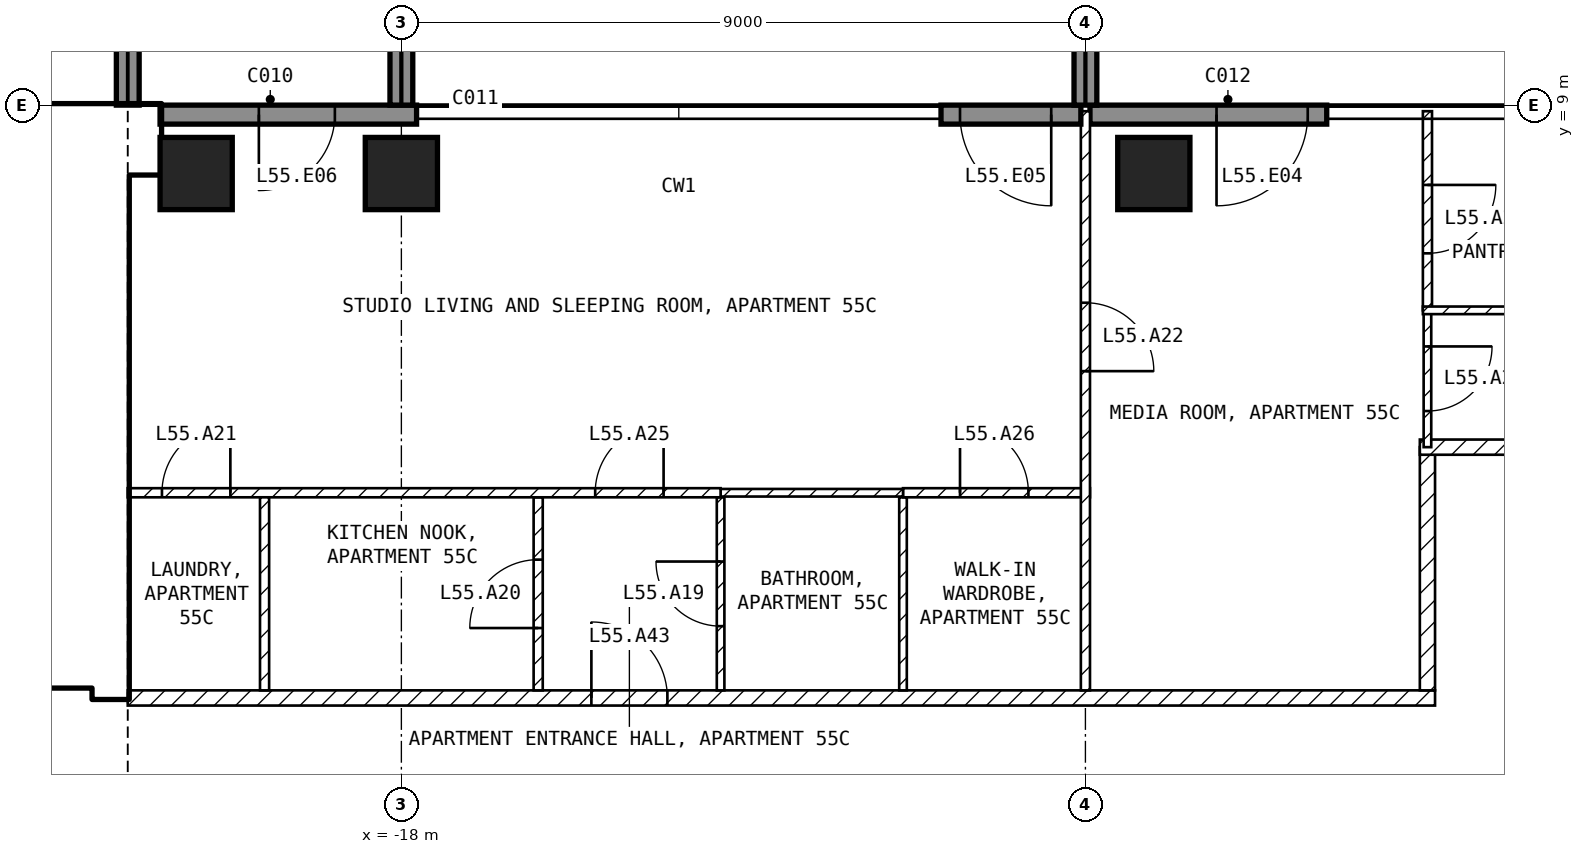
"""IFC4 building model, lengths in metres.
Left out: names, types, materials, properties, quantities, classifications, styles, units other than length and angle.
Written with IfcOpenShell. Run it as: python <this file> out.ifc"""

import sys

from ifc_helpers import new_model, si_unit, direction, frame, frame_2d, origin, origin_2d, place, context, subcontext, project, spatial, rectangle, extrude, element, fill, save


model = new_model("IFC4")
c1 = context("Model", 3, precision=1e-05, world=origin(), true_north=direction((0.0, 1.0)))
c2 = subcontext(c1, "Body", "Model", "MODEL_VIEW")
j1 = project(units=[si_unit("LENGTHUNIT", "METRE"), si_unit("PLANEANGLEUNIT", "RADIAN")], contexts=[c1])
p1 = place(None, origin())
s1 = spatial("IfcSite", under=j1, at=p1, CompositionType="ELEMENT")
p2 = place(p1, origin())
s2 = spatial("IfcBuilding", under=s1, at=p2, CompositionType="ELEMENT")
p3 = place(p2, frame((0.0, 0.0, 219.1)))
s3 = spatial("IfcBuildingStorey", under=s2, at=p3, CompositionType="ELEMENT", Elevation=219.1)
for number, where, z_axis, x_axis in (
    (1, (-20.7, 8.1, -0.25), (0.0, 0.0, 1.0), (1.0, 0.0, 0.0)),
    (2, (-18.0, 8.1, -0.25), (0.0, 0.0, 1.0), (1.0, 0.0, 0.0)),
    (3, (-8.1, 8.1, -0.25), (0.0, 0.0, 1.0), (1.0, 0.0, 0.0)),
):
    element("IfcColumn", number, at=place(p3, frame(where, z_axis=z_axis, x_axis=x_axis)), inside=s3, PredefinedType="COLUMN", context=c2, shape_type="SweptSolid", body=[
        extrude(rectangle(XDim=0.95, YDim=0.95, at=origin_2d()), origin(), (0.0, 0.0, 1.0), 3.45),
    ])
p4 = place(p3, frame((-5.825, 8.875, 0.0), z_axis=(0.0, 0.0, 1.0), x_axis=(-1.0, 0.0, 0.0)))
e4 = element("IfcWall", 4, at=p4, inside=s3, PredefinedType="SOLIDWALL", context=c2, shape_type="SweptSolid", body=[
    extrude(rectangle(XDim=3.115, YDim=0.25, at=frame_2d((1.558, 0.0))), origin(), (0.0, 0.0, 1.0), 3.2),
])
p5 = place(p4, frame((0.25, 0.0, 0.0)))
e5 = element("IfcOpeningElement", 5, at=p5, cuts=e4, PredefinedType="OPENING", context=c2, shape_type="SweptSolid", body=[
    extrude(rectangle(XDim=1.2, YDim=2.4, at=frame_2d((0.6, 1.2))), frame((0.0, 0.135, 0.0), z_axis=(0.0, -1.0, 0.0), x_axis=(1.0, 0.0, 0.0)), (0.0, 0.0, 1.0), 0.27),
])
p6 = place(p3, frame((-9.06, 8.875, 0.0), z_axis=(0.0, 0.0, 1.0), x_axis=(-1.0, 0.0, 0.0)))
e6 = element("IfcWall", 6, at=p6, inside=s3, PredefinedType="SOLIDWALL", context=c2, shape_type="SweptSolid", body=[
    extrude(rectangle(XDim=1.84, YDim=0.25, at=frame_2d((0.92, 0.0))), origin(), (0.0, 0.0, 1.0), 3.2),
])
p7 = place(p6, frame((0.39, 0.0, 0.0)))
e7 = element("IfcOpeningElement", 7, at=p7, cuts=e6, PredefinedType="OPENING", context=c2, shape_type="SweptSolid", body=[
    extrude(rectangle(XDim=1.2, YDim=2.4, at=frame_2d((0.6, 1.2))), frame((0.0, 0.135, 0.0), z_axis=(0.0, -1.0, 0.0), x_axis=(1.0, 0.0, 0.0)), (0.0, 0.0, 1.0), 0.27),
])
p8 = place(p3, frame((-17.8, 8.875, 0.0), z_axis=(0.0, 0.0, 1.0), x_axis=(-1.0, 0.0, 0.0)))
e8 = element("IfcWall", 8, at=p8, inside=s3, PredefinedType="SOLIDWALL", context=c2, shape_type="SweptSolid", body=[
    extrude(rectangle(XDim=3.375, YDim=0.25, at=frame_2d((1.688, 0.0))), origin(), (0.0, 0.0, 1.0), 3.2),
])
p9 = place(p8, frame((1.075, 0.0, 0.0)))
e9 = element("IfcOpeningElement", 9, at=p9, cuts=e8, PredefinedType="OPENING", context=c2, shape_type="SweptSolid", body=[
    extrude(rectangle(XDim=1.0, YDim=2.4, at=frame_2d((0.5, 1.2))), frame((0.0, 0.135, 0.0), z_axis=(0.0, -1.0, 0.0), x_axis=(1.0, 0.0, 0.0)), (0.0, 0.0, 1.0), 0.27),
])
for number, where, z_axis, x_axis in (
    (10, (-21.6, 9.0, 0.0), (0.0, 0.0, 1.0), (0.0, 1.0, 0.0)),
    (11, (-18.0, 9.0, 0.0), (0.0, 0.0, 1.0), (0.0, 1.0, 0.0)),
    (12, (-9.0, 9.0, 0.0), (0.0, 0.0, 1.0), (0.0, 1.0, 0.0)),
):
    element("IfcWall", number, at=place(p3, frame(where, z_axis=z_axis, x_axis=x_axis)), inside=s3, PredefinedType="SOLIDWALL", context=c2, shape_type="SweptSolid", body=[
        extrude(rectangle(XDim=2.7, YDim=0.3, at=frame_2d((1.35, 0.0))), origin(), (0.0, 0.0, 1.0), 3.2),
    ])
p10 = place(p3, frame((-29.6, 8.55, 0.0), z_axis=(0.0, 0.0, 1.0), x_axis=(1.0, 0.0, 0.0)))
e13 = element("IfcWall", 13, at=p10, inside=s3, PredefinedType="SHEAR", context=c2, shape_type="SweptSolid", body=[
    extrude(rectangle(XDim=8.425, YDim=0.9, at=frame_2d((4.212, 0.0))), origin(), (0.0, 0.0, 1.0), 3.2),
])
p11 = place(p3, frame((-21.825, 1.2, 0.0), z_axis=(0.0, 0.0, 1.0), x_axis=(0.0, 1.0, 0.0)))
e14 = element("IfcWall", 14, at=p11, inside=s3, PredefinedType="SHEAR", context=c2, shape_type="SweptSolid", body=[
    extrude(rectangle(XDim=6.9, YDim=0.45, at=frame_2d((3.45, 0.0))), origin(), (0.0, 0.0, 1.0), 3.2),
])
p12 = place(p3, frame((-33.2, 1.45, 0.0), z_axis=(0.0, 0.0, 1.0), x_axis=(1.0, 0.0, 0.0)))
e15 = element("IfcWall", 15, at=p12, inside=s3, PredefinedType="SOLIDWALL", context=c2, shape_type="SweptSolid", body=[
    extrude(rectangle(XDim=11.15, YDim=0.2, at=frame_2d((5.575, 0.0))), origin(), (0.0, 0.0, 1.0), 3.2),
])
p13 = place(p12, frame((9.4, 0.0, 0.0)))
e16 = element("IfcOpeningElement", 16, at=p13, cuts=e15, PredefinedType="OPENING", context=c2, shape_type="SweptSolid", body=[
    extrude(rectangle(XDim=1.0, YDim=2.1, at=frame_2d((0.5, 1.05))), frame((0.0, 0.11, 0.0), z_axis=(0.0, -1.0, 0.0), x_axis=(1.0, 0.0, 0.0)), (0.0, 0.0, 1.0), 0.22),
])
p14 = place(p12, frame((6.9, 0.0, 0.0)))
e17 = element("IfcOpeningElement", 17, at=p14, cuts=e15, PredefinedType="OPENING", context=c2, shape_type="SweptSolid", body=[
    extrude(rectangle(XDim=1.0, YDim=2.1, at=frame_2d((0.5, 1.05))), frame((0.0, 0.11, 0.0), z_axis=(0.0, -1.0, 0.0), x_axis=(1.0, 0.0, 0.0)), (0.0, 0.0, 1.0), 0.22),
])
p15 = place(p12, frame((1.1, 0.0, 0.0)))
e18 = element("IfcOpeningElement", 18, at=p15, cuts=e15, PredefinedType="OPENING", context=c2, shape_type="SweptSolid", body=[
    extrude(rectangle(XDim=0.9, YDim=2.1, at=frame_2d((0.45, 1.05))), frame((0.0, 0.11, 0.0), z_axis=(0.0, -1.0, 0.0), x_axis=(1.0, 0.0, 0.0)), (0.0, 0.0, 1.0), 0.22),
])
p16 = place(p3, frame((-28.35, 5.15, 0.0), z_axis=(0.0, 0.0, 1.0), x_axis=(1.0, 0.0, 0.0)))
e19 = element("IfcWall", 19, at=p16, inside=s3, PredefinedType="SOLIDWALL", context=c2, shape_type="SweptSolid", body=[
    extrude(rectangle(XDim=6.3, YDim=0.2, at=frame_2d((3.15, 0.0))), origin(), (0.0, 0.0, 1.0), 3.2),
])
p17 = place(p16, frame((5.1, 0.0, 0.0)))
e20 = element("IfcOpeningElement", 20, at=p17, cuts=e19, PredefinedType="OPENING", context=c2, shape_type="SweptSolid", body=[
    extrude(rectangle(XDim=1.0, YDim=2.1, at=frame_2d((0.5, 1.05))), frame((0.0, 0.11, 0.0), z_axis=(0.0, -1.0, 0.0), x_axis=(1.0, 0.0, 0.0)), (0.0, 0.0, 1.0), 0.22),
])
p18 = place(p3, frame((-21.6, 1.2, 0.0), z_axis=(0.0, 0.0, 1.0), x_axis=(1.0, 0.0, 0.0)))
e21 = element("IfcWall", 21, at=p18, inside=s3, PredefinedType="PARTITIONING", context=c2, shape_type="SweptSolid", body=[
    extrude(rectangle(XDim=17.2, YDim=0.2, at=frame_2d((8.6, 0.0))), origin(), (0.0, 0.0, 1.0), 3.2),
])
p19 = place(p18, frame((6.1, 0.0, 0.0)))
e22 = element("IfcOpeningElement", 22, at=p19, cuts=e21, PredefinedType="OPENING", context=c2, shape_type="SweptSolid", body=[
    extrude(rectangle(XDim=1.0, YDim=2.1, at=frame_2d((0.5, 1.05))), frame((0.0, 0.11, 0.0), z_axis=(0.0, -1.0, 0.0), x_axis=(1.0, 0.0, 0.0)), (0.0, 0.0, 1.0), 0.22),
])
p20 = place(p3, frame((-4.5, 1.3, 0.0), z_axis=(0.0, 0.0, 1.0), x_axis=(0.0, 1.0, 0.0)))
e23 = element("IfcWall", 23, at=p20, inside=s3, PredefinedType="PARTITIONING", context=c2, shape_type="SweptSolid", body=[
    extrude(rectangle(XDim=3.2, YDim=0.2, at=frame_2d((1.6, 0.0))), origin(), (0.0, 0.0, 1.0), 3.2),
])
p21 = place(p3, frame((-4.6, 4.5, 0.0), z_axis=(0.0, 0.0, 1.0), x_axis=(1.0, 0.0, 0.0)))
e24 = element("IfcWall", 24, at=p21, inside=s3, PredefinedType="PARTITIONING", context=c2, shape_type="SweptSolid", body=[
    extrude(rectangle(XDim=3.5, YDim=0.2, at=frame_2d((1.75, 0.0))), origin(), (0.0, 0.0, 1.0), 3.2),
])
p22 = place(p3, frame((-11.4, 1.3, 0.0), z_axis=(0.0, 0.0, 1.0), x_axis=(0.0, 1.0, 0.0)))
e25 = element("IfcWall", 25, at=p22, inside=s3, PredefinedType="PARTITIONING", context=c2, shape_type="SweptSolid", body=[
    extrude(rectangle(XDim=2.54, YDim=0.1, at=frame_2d((1.27, 0.0))), origin(), (0.0, 0.0, 1.0), 3.2),
])
p23 = place(p3, frame((-11.4, 3.9, 0.0), z_axis=(0.0, 0.0, 1.0), x_axis=(1.0, 0.0, 0.0)))
e26 = element("IfcWall", 26, at=p23, inside=s3, PredefinedType="PARTITIONING", context=c2, shape_type="SweptSolid", body=[
    extrude(rectangle(XDim=2.46, YDim=0.12, at=frame_2d((1.23, 0.0))), origin(), (0.0, 0.0, 1.0), 3.2),
])
p24 = place(p23, frame((0.75, 0.0, 0.0)))
e27 = element("IfcOpeningElement", 27, at=p24, cuts=e26, PredefinedType="OPENING", context=c2, shape_type="SweptSolid", body=[
    extrude(rectangle(XDim=0.9, YDim=2.1, at=frame_2d((0.45, 1.05))), frame((0.0, 0.07, 0.0), z_axis=(0.0, -1.0, 0.0), x_axis=(1.0, 0.0, 0.0)), (0.0, 0.0, 1.0), 0.14),
])
p25 = place(p3, frame((-9.0, 8.92, 0.0), z_axis=(0.0, 0.0, 1.0), x_axis=(0.0, -1.0, 0.0)))
e28 = element("IfcWall", 28, at=p25, inside=s3, PredefinedType="PARTITIONING", context=c2, shape_type="SweptSolid", body=[
    extrude(rectangle(XDim=7.62, YDim=0.12, at=frame_2d((3.81, 0.0))), origin(), (0.0, 0.0, 1.0), 3.2),
])
p26 = place(p25, frame((2.52, 0.0, 0.0)))
e29 = element("IfcOpeningElement", 29, at=p26, cuts=e28, PredefinedType="OPENING", context=c2, shape_type="SweptSolid", body=[
    extrude(rectangle(XDim=0.9, YDim=2.1, at=frame_2d((0.45, 1.05))), frame((0.0, 0.07, 0.0), z_axis=(0.0, -1.0, 0.0), x_axis=(1.0, 0.0, 0.0)), (0.0, 0.0, 1.0), 0.14),
])
p27 = place(p3, frame((-13.8, 1.3, 0.0), z_axis=(0.0, 0.0, 1.0), x_axis=(0.0, 1.0, 0.0)))
e30 = element("IfcWall", 30, at=p27, inside=s3, PredefinedType="PARTITIONING", context=c2, shape_type="SweptSolid", body=[
    extrude(rectangle(XDim=2.54, YDim=0.1, at=frame_2d((1.27, 0.0))), origin(), (0.0, 0.0, 1.0), 3.2),
])
p28 = place(p27, frame((0.845, 0.0, 0.0)))
e31 = element("IfcOpeningElement", 31, at=p28, cuts=e30, PredefinedType="OPENING", context=c2, shape_type="SweptSolid", body=[
    extrude(rectangle(XDim=0.85, YDim=2.1, at=frame_2d((0.425, 1.05))), frame((0.0, 0.06, 0.0), z_axis=(0.0, -1.0, 0.0), x_axis=(1.0, 0.0, 0.0)), (0.0, 0.0, 1.0), 0.12),
])
p29 = place(p3, frame((-13.8, 3.9, 0.0), z_axis=(0.0, 0.0, 1.0), x_axis=(1.0, 0.0, 0.0)))
e32 = element("IfcWall", 32, at=p29, inside=s3, PredefinedType="PARTITIONING", context=c2, shape_type="SweptSolid", body=[
    extrude(rectangle(XDim=2.4, YDim=0.1, at=frame_2d((1.2, 0.0))), origin(), (0.0, 0.0, 1.0), 3.2),
])
p30 = place(p3, frame((-16.2, 1.3, 0.0), z_axis=(0.0, 0.0, 1.0), x_axis=(0.0, 1.0, 0.0)))
e33 = element("IfcWall", 33, at=p30, inside=s3, PredefinedType="PARTITIONING", context=c2, shape_type="SweptSolid", body=[
    extrude(rectangle(XDim=2.54, YDim=0.12, at=frame_2d((1.27, 0.0))), origin(), (0.0, 0.0, 1.0), 3.2),
])
p31 = place(p30, frame((0.82, 0.0, 0.0)))
e34 = element("IfcOpeningElement", 34, at=p31, cuts=e33, PredefinedType="OPENING", context=c2, shape_type="SweptSolid", body=[
    extrude(rectangle(XDim=0.9, YDim=2.1, at=frame_2d((0.45, 1.05))), frame((0.0, 0.07, 0.0), z_axis=(0.0, -1.0, 0.0), x_axis=(1.0, 0.0, 0.0)), (0.0, 0.0, 1.0), 0.14),
])
p32 = place(p3, frame((-21.6, 3.9, 0.0), z_axis=(0.0, 0.0, 1.0), x_axis=(1.0, 0.0, 0.0)))
e35 = element("IfcWall", 35, at=p32, inside=s3, PredefinedType="PARTITIONING", context=c2, shape_type="SweptSolid", body=[
    extrude(rectangle(XDim=7.8, YDim=0.12, at=frame_2d((3.9, 0.0))), origin(), (0.0, 0.0, 1.0), 3.2),
])
p33 = place(p32, frame((0.45, 0.0, 0.0)))
e36 = element("IfcOpeningElement", 36, at=p33, cuts=e35, PredefinedType="OPENING", context=c2, shape_type="SweptSolid", body=[
    extrude(rectangle(XDim=0.9, YDim=2.1, at=frame_2d((0.45, 1.05))), frame((0.0, 0.07, 0.0), z_axis=(0.0, -1.0, 0.0), x_axis=(1.0, 0.0, 0.0)), (0.0, 0.0, 1.0), 0.14),
])
p34 = place(p32, frame((6.15, 0.0, 0.0)))
e37 = element("IfcOpeningElement", 37, at=p34, cuts=e35, PredefinedType="OPENING", context=c2, shape_type="SweptSolid", body=[
    extrude(rectangle(XDim=0.9, YDim=2.1, at=frame_2d((0.45, 1.05))), frame((0.0, 0.07, 0.0), z_axis=(0.0, -1.0, 0.0), x_axis=(1.0, 0.0, 0.0)), (0.0, 0.0, 1.0), 0.14),
])
p35 = place(p3, frame((-19.8, 1.3, 0.0), z_axis=(0.0, 0.0, 1.0), x_axis=(0.0, 1.0, 0.0)))
e38 = element("IfcWall", 38, at=p35, inside=s3, PredefinedType="PARTITIONING", context=c2, shape_type="SweptSolid", body=[
    extrude(rectangle(XDim=2.54, YDim=0.12, at=frame_2d((1.27, 0.0))), origin(), (0.0, 0.0, 1.0), 3.2),
])
p36 = place(p3, frame((-4.5, 6.3, 0.0), z_axis=(0.0, 0.0, 1.0), x_axis=(0.0, -1.0, 0.0)))
e39 = element("IfcWall", 39, at=p36, inside=s3, PredefinedType="PARTITIONING", context=c2, shape_type="SweptSolid", body=[
    extrude(rectangle(XDim=1.8, YDim=0.1, at=frame_2d((0.9, 0.0))), origin(), (0.0, 0.0, 1.0), 3.2),
])
p37 = place(p36, frame((0.475, 0.0, 0.0)))
e40 = element("IfcOpeningElement", 40, at=p37, cuts=e39, PredefinedType="OPENING", context=c2, shape_type="SweptSolid", body=[
    extrude(rectangle(XDim=0.85, YDim=2.1, at=frame_2d((0.425, 1.05))), frame((0.0, 0.06, 0.0), z_axis=(0.0, -1.0, 0.0), x_axis=(1.0, 0.0, 0.0)), (0.0, 0.0, 1.0), 0.12),
])
p38 = place(p3, frame((-4.5, 8.92, 0.0), z_axis=(0.0, 0.0, 1.0), x_axis=(0.0, -1.0, 0.0)))
e41 = element("IfcWall", 41, at=p38, inside=s3, PredefinedType="PARTITIONING", context=c2, shape_type="SweptSolid", body=[
    extrude(rectangle(XDim=2.62, YDim=0.12, at=frame_2d((1.31, 0.0))), origin(), (0.0, 0.0, 1.0), 3.2),
])
p39 = place(p38, frame((0.97, 0.0, 0.0)))
e42 = element("IfcOpeningElement", 42, at=p39, cuts=e41, PredefinedType="OPENING", context=c2, shape_type="SweptSolid", body=[
    extrude(rectangle(XDim=0.9, YDim=2.1, at=frame_2d((0.45, 1.05))), frame((0.0, 0.07, 0.0), z_axis=(0.0, -1.0, 0.0), x_axis=(1.0, 0.0, 0.0)), (0.0, 0.0, 1.0), 0.14),
])
p40 = place(p3, frame((-4.56, 6.3, 0.0), z_axis=(0.0, 0.0, 1.0), x_axis=(1.0, 0.0, 0.0)))
e43 = element("IfcWall", 43, at=p40, inside=s3, PredefinedType="PARTITIONING", context=c2, shape_type="SweptSolid", body=[
    extrude(rectangle(XDim=3.46, YDim=0.1, at=frame_2d((1.73, 0.0))), origin(), (0.0, 0.0, 1.0), 3.2),
])
p41 = place(p5, origin())
e44 = element("IfcDoor", 44, at=p41, inside=s3, OperationType="SINGLE_SWING_RIGHT", PredefinedType="DOOR", context=c2, shape_type="SweptSolid", body=[
    extrude(rectangle(XDim=1.2, YDim=2.4, at=frame_2d((0.6, 1.2))), frame((0.0, 0.025, 0.0), z_axis=(0.0, -1.0, 0.0), x_axis=(1.0, 0.0, 0.0)), (0.0, 0.0, 1.0), 0.05),
])
fill(e5, e44)
p42 = place(p7, origin())
e45 = element("IfcDoor", 45, at=p42, inside=s3, OperationType="SINGLE_SWING_LEFT", PredefinedType="DOOR", context=c2, shape_type="SweptSolid", body=[
    extrude(rectangle(XDim=1.2, YDim=2.4, at=frame_2d((0.6, 1.2))), frame((0.0, 0.025, 0.0), z_axis=(0.0, -1.0, 0.0), x_axis=(1.0, 0.0, 0.0)), (0.0, 0.0, 1.0), 0.05),
])
fill(e7, e45)
p43 = place(p9, origin())
e46 = element("IfcDoor", 46, at=p43, inside=s3, OperationType="SINGLE_SWING_RIGHT", PredefinedType="DOOR", context=c2, shape_type="SweptSolid", body=[
    extrude(rectangle(XDim=1.0, YDim=2.4, at=frame_2d((0.5, 1.2))), frame((0.0, 0.025, 0.0), z_axis=(0.0, -1.0, 0.0), x_axis=(1.0, 0.0, 0.0)), (0.0, 0.0, 1.0), 0.05),
])
fill(e9, e46)
p44 = place(p17, origin())
e47 = element("IfcDoor", 47, at=p44, inside=s3, OperationType="SINGLE_SWING_LEFT", PredefinedType="DOOR", context=c2, shape_type="SweptSolid", body=[
    extrude(rectangle(XDim=1.0, YDim=2.1, at=frame_2d((0.5, 1.05))), frame((0.0, 0.025, 0.0), z_axis=(0.0, -1.0, 0.0), x_axis=(1.0, 0.0, 0.0)), (0.0, 0.0, 1.0), 0.05),
])
fill(e20, e47)
p45 = place(p28, origin())
e48 = element("IfcDoor", 48, at=p45, inside=s3, OperationType="SINGLE_SWING_RIGHT", PredefinedType="DOOR", context=c2, shape_type="SweptSolid", body=[
    extrude(rectangle(XDim=0.85, YDim=2.1, at=frame_2d((0.425, 1.05))), frame((0.0, 0.025, 0.0), z_axis=(0.0, -1.0, 0.0), x_axis=(1.0, 0.0, 0.0)), (0.0, 0.0, 1.0), 0.05),
])
fill(e31, e48)
p46 = place(p31, origin())
e49 = element("IfcDoor", 49, at=p46, inside=s3, OperationType="SINGLE_SWING_LEFT", PredefinedType="DOOR", context=c2, shape_type="SweptSolid", body=[
    extrude(rectangle(XDim=0.9, YDim=2.1, at=frame_2d((0.45, 1.05))), frame((0.0, 0.025, 0.0), z_axis=(0.0, -1.0, 0.0), x_axis=(1.0, 0.0, 0.0)), (0.0, 0.0, 1.0), 0.05),
])
fill(e34, e49)
p47 = place(p33, origin())
e50 = element("IfcDoor", 50, at=p47, inside=s3, OperationType="SINGLE_SWING_RIGHT", PredefinedType="DOOR", context=c2, shape_type="SweptSolid", body=[
    extrude(rectangle(XDim=0.9, YDim=2.1, at=frame_2d((0.45, 1.05))), frame((0.0, 0.025, 0.0), z_axis=(0.0, -1.0, 0.0), x_axis=(1.0, 0.0, 0.0)), (0.0, 0.0, 1.0), 0.05),
])
fill(e36, e50)
p48 = place(p26, origin())
e51 = element("IfcDoor", 51, at=p48, inside=s3, OperationType="SINGLE_SWING_RIGHT", PredefinedType="DOOR", context=c2, shape_type="SweptSolid", body=[
    extrude(rectangle(XDim=0.9, YDim=2.1, at=frame_2d((0.45, 1.05))), frame((0.0, 0.025, 0.0), z_axis=(0.0, -1.0, 0.0), x_axis=(1.0, 0.0, 0.0)), (0.0, 0.0, 1.0), 0.05),
])
fill(e29, e51)
p49 = place(p39, origin())
e52 = element("IfcDoor", 52, at=p49, inside=s3, OperationType="SINGLE_SWING_LEFT", PredefinedType="DOOR", context=c2, shape_type="SweptSolid", body=[
    extrude(rectangle(XDim=0.9, YDim=2.1, at=frame_2d((0.45, 1.05))), frame((0.0, 0.025, 0.0), z_axis=(0.0, -1.0, 0.0), x_axis=(1.0, 0.0, 0.0)), (0.0, 0.0, 1.0), 0.05),
])
fill(e42, e52)
p50 = place(p37, origin())
e53 = element("IfcDoor", 53, at=p50, inside=s3, OperationType="SINGLE_SWING_LEFT", PredefinedType="DOOR", context=c2, shape_type="SweptSolid", body=[
    extrude(rectangle(XDim=0.85, YDim=2.1, at=frame_2d((0.425, 1.05))), frame((0.0, 0.025, 0.0), z_axis=(0.0, -1.0, 0.0), x_axis=(1.0, 0.0, 0.0)), (0.0, 0.0, 1.0), 0.05),
])
fill(e40, e53)
p51 = place(p34, origin())
e54 = element("IfcDoor", 54, at=p51, inside=s3, OperationType="SINGLE_SWING_RIGHT", PredefinedType="DOOR", context=c2, shape_type="SweptSolid", body=[
    extrude(rectangle(XDim=0.9, YDim=2.1, at=frame_2d((0.45, 1.05))), frame((0.0, 0.025, 0.0), z_axis=(0.0, -1.0, 0.0), x_axis=(1.0, 0.0, 0.0)), (0.0, 0.0, 1.0), 0.05),
])
fill(e37, e54)
p52 = place(p24, origin())
e55 = element("IfcDoor", 55, at=p52, inside=s3, OperationType="SINGLE_SWING_LEFT", PredefinedType="DOOR", context=c2, shape_type="SweptSolid", body=[
    extrude(rectangle(XDim=0.9, YDim=2.1, at=frame_2d((0.45, 1.05))), frame((0.0, 0.025, 0.0), z_axis=(0.0, -1.0, 0.0), x_axis=(1.0, 0.0, 0.0)), (0.0, 0.0, 1.0), 0.05),
])
fill(e27, e55)
p53 = place(p19, origin())
e56 = element("IfcDoor", 56, at=p53, inside=s3, OperationType="SINGLE_SWING_LEFT", PredefinedType="DOOR", context=c2, shape_type="SweptSolid", body=[
    extrude(rectangle(XDim=1.0, YDim=2.1, at=frame_2d((0.5, 1.05))), frame((0.0, 0.025, 0.0), z_axis=(0.0, -1.0, 0.0), x_axis=(1.0, 0.0, 0.0)), (0.0, 0.0, 1.0), 0.05),
])
fill(e22, e56)
save(model, sys.argv[1])
